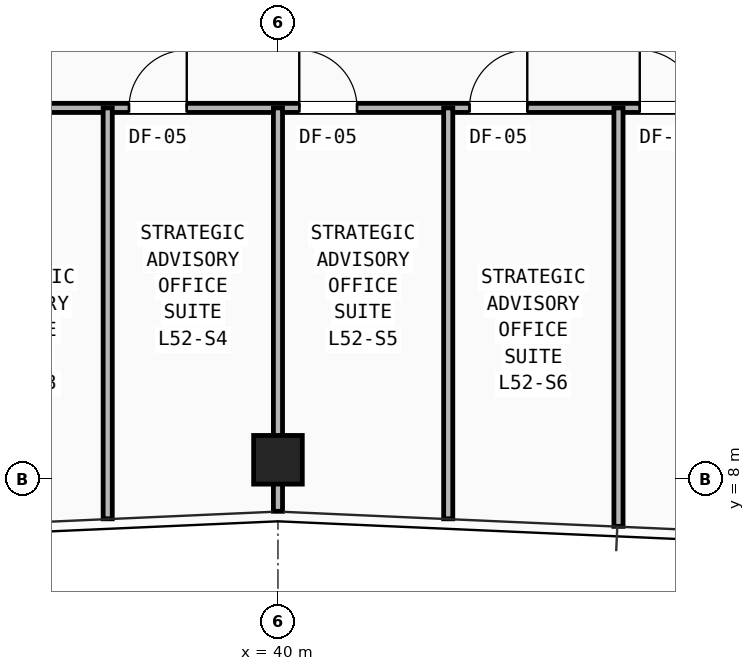
"""IFC4 building model, lengths in metres.
Left out: names, types, materials, properties, quantities, classifications, styles, units other than length and angle.
Written with IfcOpenShell. Run it as: python <this file> out.ifc"""

import sys

from ifc_helpers import new_model, si_unit, direction, frame, frame_2d, origin, origin_2d, place, context, subcontext, project, spatial, rectangle, hollow_rectangle, extrude, element, fill, save


model = new_model("IFC4")
c1 = context("Model", 3, precision=1e-05, world=origin(), true_north=direction((0.0, 1.0)))
c2 = subcontext(c1, "Body", "Model", "MODEL_VIEW")
j1 = project(units=[si_unit("LENGTHUNIT", "METRE"), si_unit("PLANEANGLEUNIT", "RADIAN")], contexts=[c1])
p1 = place(None, origin())
s1 = spatial("IfcSite", under=j1, at=p1, CompositionType="ELEMENT")
p2 = place(p1, origin())
s2 = spatial("IfcBuilding", under=s1, at=p2, CompositionType="ELEMENT")
p3 = place(p2, frame((0.0, 0.0, 182.7)))
s3 = spatial("IfcBuildingStorey", under=s2, at=p3, CompositionType="ELEMENT", Elevation=182.7)
p4 = place(p3, frame((40.0, 8.312, 0.0), z_axis=(0.0, 0.0, 1.0), x_axis=(1.0, 0.0, 0.0)))
e1 = element("IfcColumn", 1, at=p4, inside=s3, PredefinedType="COLUMN", context=c2, shape_type="SweptSolid", body=[
    extrude(hollow_rectangle(XDim=0.8, YDim=0.8, WallThickness=0.055, at=origin_2d()), origin(), (0.0, 0.0, 1.0), 3.45),
])
p5 = place(p3, frame((29.6, 14.1, 0.0), z_axis=(0.0, 0.0, 1.0), x_axis=(1.0, 0.0, 0.0)))
e2 = element("IfcWall", 2, at=p5, inside=s3, PredefinedType="PARTITIONING", context=c2, shape_type="SweptSolid", body=[
    extrude(rectangle(XDim=18.6, YDim=0.15, at=frame_2d((9.3, 0.0))), origin(), (0.0, 0.0, 1.0), 2.252),
])
p6 = place(p5, frame((0.55, 0.0, 0.0)))
e3 = element("IfcOpeningElement", 3, at=p6, cuts=e2, PredefinedType="OPENING", context=c2, shape_type="SweptSolid", body=[
    extrude(rectangle(XDim=0.95, YDim=2.1, at=frame_2d((0.475, 1.05))), frame((0.0, 0.085, 0.0), z_axis=(0.0, -1.0, 0.0), x_axis=(1.0, 0.0, 0.0)), (0.0, 0.0, 1.0), 0.17),
])
p7 = place(p5, frame((2.35, 0.0, 0.0)))
e4 = element("IfcOpeningElement", 4, at=p7, cuts=e2, PredefinedType="OPENING", context=c2, shape_type="SweptSolid", body=[
    extrude(rectangle(XDim=0.95, YDim=2.1, at=frame_2d((0.475, 1.05))), frame((0.0, 0.085, 0.0), z_axis=(0.0, -1.0, 0.0), x_axis=(1.0, 0.0, 0.0)), (0.0, 0.0, 1.0), 0.17),
])
p8 = place(p5, frame((5.15, 0.0, 0.0)))
e5 = element("IfcOpeningElement", 5, at=p8, cuts=e2, PredefinedType="OPENING", context=c2, shape_type="SweptSolid", body=[
    extrude(rectangle(XDim=0.95, YDim=2.1, at=frame_2d((0.475, 1.05))), frame((0.0, 0.085, 0.0), z_axis=(0.0, -1.0, 0.0), x_axis=(1.0, 0.0, 0.0)), (0.0, 0.0, 1.0), 0.17),
])
p9 = place(p5, frame((7.95, 0.0, 0.0)))
e6 = element("IfcOpeningElement", 6, at=p9, cuts=e2, PredefinedType="OPENING", context=c2, shape_type="SweptSolid", body=[
    extrude(rectangle(XDim=0.95, YDim=2.1, at=frame_2d((0.475, 1.05))), frame((0.0, 0.085, 0.0), z_axis=(0.0, -1.0, 0.0), x_axis=(1.0, 0.0, 0.0)), (0.0, 0.0, 1.0), 0.17),
])
p10 = place(p5, frame((10.75, 0.0, 0.0)))
e7 = element("IfcOpeningElement", 7, at=p10, cuts=e2, PredefinedType="OPENING", context=c2, shape_type="SweptSolid", body=[
    extrude(rectangle(XDim=0.95, YDim=2.1, at=frame_2d((0.475, 1.05))), frame((0.0, 0.085, 0.0), z_axis=(0.0, -1.0, 0.0), x_axis=(1.0, 0.0, 0.0)), (0.0, 0.0, 1.0), 0.17),
])
p11 = place(p5, frame((13.55, 0.0, 0.0)))
e8 = element("IfcOpeningElement", 8, at=p11, cuts=e2, PredefinedType="OPENING", context=c2, shape_type="SweptSolid", body=[
    extrude(rectangle(XDim=0.95, YDim=2.1, at=frame_2d((0.475, 1.05))), frame((0.0, 0.085, 0.0), z_axis=(0.0, -1.0, 0.0), x_axis=(1.0, 0.0, 0.0)), (0.0, 0.0, 1.0), 0.17),
])
p12 = place(p5, frame((16.35, 0.0, 0.0)))
e9 = element("IfcOpeningElement", 9, at=p12, cuts=e2, PredefinedType="OPENING", context=c2, shape_type="SweptSolid", body=[
    extrude(rectangle(XDim=0.95, YDim=2.1, at=frame_2d((0.475, 1.05))), frame((0.0, 0.085, 0.0), z_axis=(0.0, -1.0, 0.0), x_axis=(1.0, 0.0, 0.0)), (0.0, 0.0, 1.0), 0.17),
])
p13 = place(p3, frame((37.2, 7.342, 0.0), z_axis=(0.0, 0.0, 1.0), x_axis=(0.0, 1.0, 0.0)))
e10 = element("IfcWall", 10, at=p13, inside=s3, PredefinedType="PARTITIONING", context=c2, shape_type="SweptSolid", body=[
    extrude(rectangle(XDim=6.759, YDim=0.15, at=frame_2d((3.379, 0.0))), origin(), (0.0, 0.0, 1.0), 2.252),
])
p14 = place(p3, frame((40.0, 7.465, 0.0), z_axis=(0.0, 0.0, 1.0), x_axis=(0.0, 1.0, 0.0)))
e11 = element("IfcWall", 11, at=p14, inside=s3, PredefinedType="PARTITIONING", context=c2, shape_type="SweptSolid", body=[
    extrude(rectangle(XDim=6.635, YDim=0.15, at=frame_2d((3.317, 0.0))), origin(), (0.0, 0.0, 1.0), 2.252),
])
p15 = place(p3, frame((42.8, 7.342, 0.0), z_axis=(0.0, 0.0, 1.0), x_axis=(0.0, 1.0, 0.0)))
e12 = element("IfcWall", 12, at=p15, inside=s3, PredefinedType="PARTITIONING", context=c2, shape_type="SweptSolid", body=[
    extrude(rectangle(XDim=6.759, YDim=0.15, at=frame_2d((3.379, 0.0))), origin(), (0.0, 0.0, 1.0), 2.589),
])
p16 = place(p3, frame((45.6, 7.217, 0.0), z_axis=(0.0, 0.0, 1.0), x_axis=(0.0, 1.0, 0.0)))
e13 = element("IfcWall", 13, at=p16, inside=s3, PredefinedType="PARTITIONING", context=c2, shape_type="SweptSolid", body=[
    extrude(rectangle(XDim=6.883, YDim=0.15, at=frame_2d((3.441, 0.0))), origin(), (0.0, 0.0, 1.0), 2.589),
])
p17 = place(p9, origin())
e14 = element("IfcDoor", 14, at=p17, inside=s3, OperationType="SINGLE_SWING_RIGHT", PredefinedType="DOOR", context=c2, shape_type="SweptSolid", body=[
    extrude(rectangle(XDim=0.95, YDim=2.1, at=frame_2d((0.475, 1.05))), frame((0.0, 0.025, 0.0), z_axis=(0.0, -1.0, 0.0), x_axis=(1.0, 0.0, 0.0)), (0.0, 0.0, 1.0), 0.05),
])
fill(e6, e14)
p18 = place(p10, origin())
e15 = element("IfcDoor", 15, at=p18, inside=s3, OperationType="SINGLE_SWING_LEFT", PredefinedType="DOOR", context=c2, shape_type="SweptSolid", body=[
    extrude(rectangle(XDim=0.95, YDim=2.1, at=frame_2d((0.475, 1.05))), frame((0.0, 0.025, 0.0), z_axis=(0.0, -1.0, 0.0), x_axis=(1.0, 0.0, 0.0)), (0.0, 0.0, 1.0), 0.05),
])
fill(e7, e15)
p19 = place(p11, origin())
e16 = element("IfcDoor", 16, at=p19, inside=s3, OperationType="SINGLE_SWING_RIGHT", PredefinedType="DOOR", context=c2, shape_type="SweptSolid", body=[
    extrude(rectangle(XDim=0.95, YDim=2.1, at=frame_2d((0.475, 1.05))), frame((0.0, 0.025, 0.0), z_axis=(0.0, -1.0, 0.0), x_axis=(1.0, 0.0, 0.0)), (0.0, 0.0, 1.0), 0.05),
])
fill(e8, e16)
p20 = place(p12, origin())
e17 = element("IfcDoor", 17, at=p20, inside=s3, OperationType="SINGLE_SWING_LEFT", PredefinedType="DOOR", context=c2, shape_type="SweptSolid", body=[
    extrude(rectangle(XDim=0.95, YDim=2.1, at=frame_2d((0.475, 1.05))), frame((0.0, 0.025, 0.0), z_axis=(0.0, -1.0, 0.0), x_axis=(1.0, 0.0, 0.0)), (0.0, 0.0, 1.0), 0.05),
])
fill(e9, e17)
save(model, sys.argv[1])
